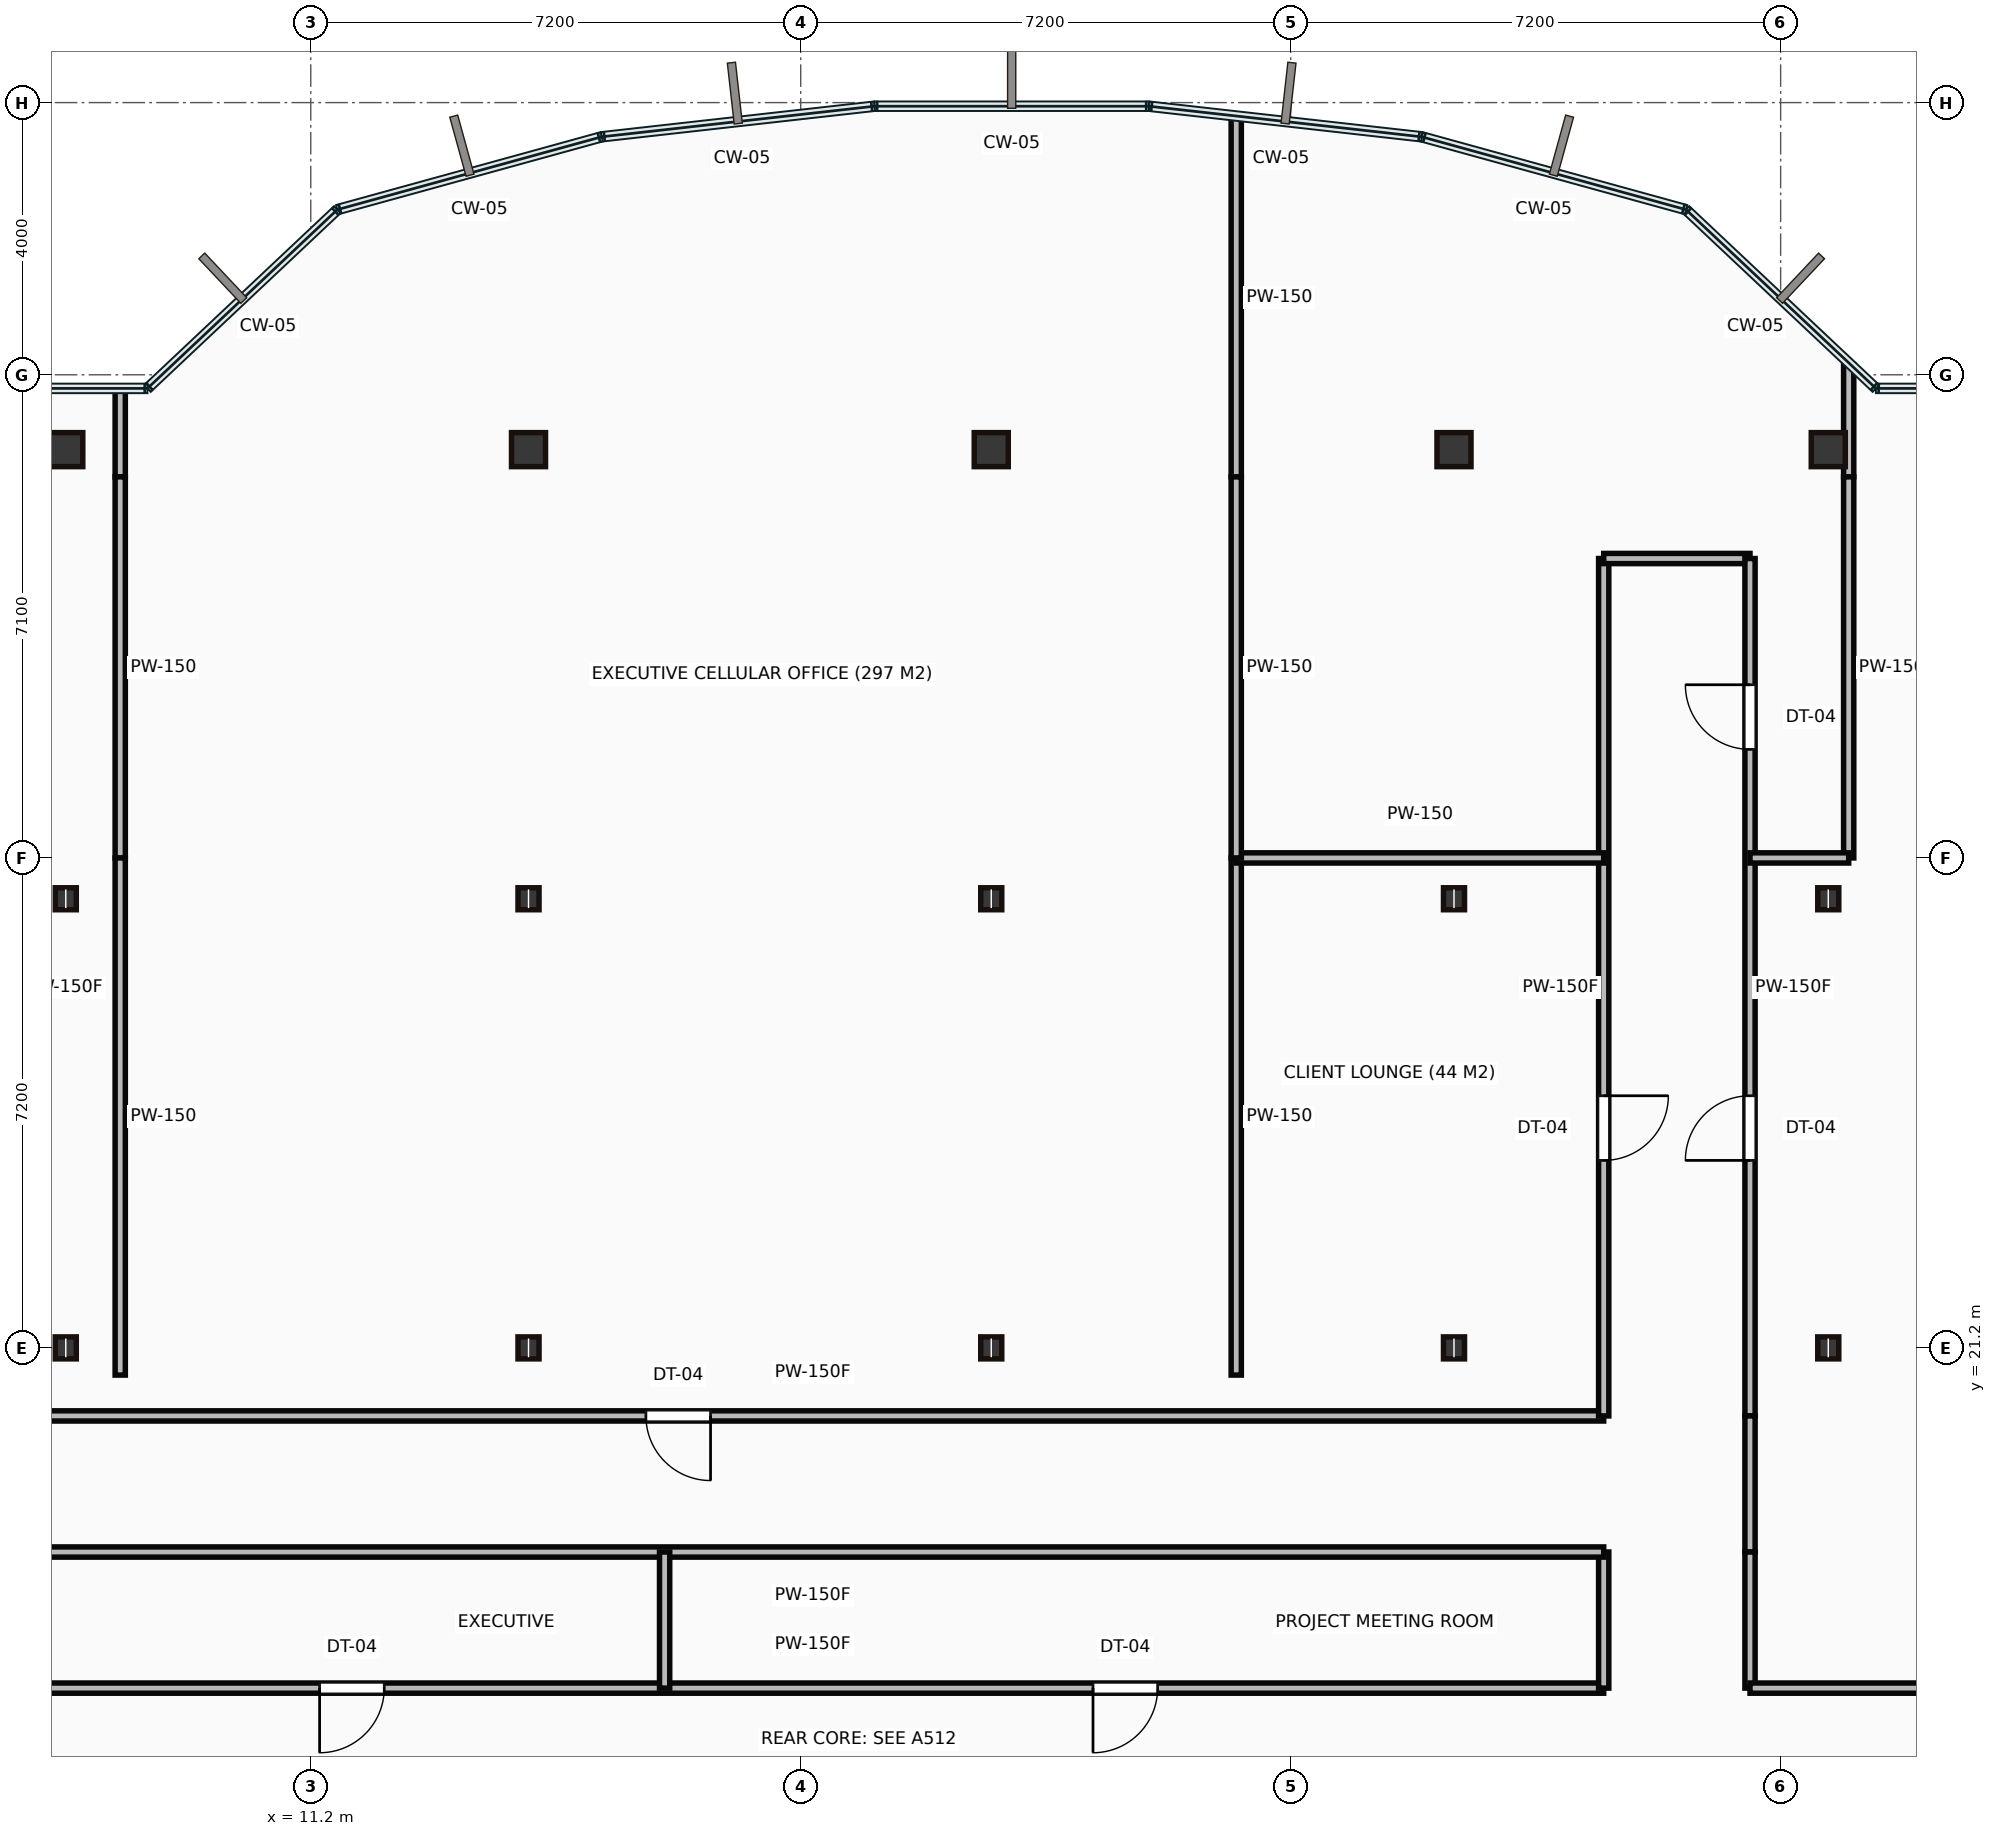
"""IFC4 building model, lengths in metres.
Left out: names, types, materials, properties, quantities, classifications, styles, units other than length and angle.
Written with IfcOpenShell. Run it as: python <this file> out.ifc"""

import sys

from ifc_helpers import new_model, si_unit, direction, frame, frame_2d, origin, origin_2d, place, context, subcontext, project, spatial, rectangle, hollow_rectangle, i_section, extrude, source, transform, mapped, element, fill, save


model = new_model("IFC4")
c1 = context("Model", 3, precision=1e-05, world=origin(), true_north=direction((0.0, 1.0)))
c2 = subcontext(c1, "Body", "Model", "MODEL_VIEW")
j1 = project(units=[si_unit("LENGTHUNIT", "METRE"), si_unit("PLANEANGLEUNIT", "RADIAN")], contexts=[c1])
p1 = place(None, origin())
s1 = spatial("IfcSite", under=j1, at=p1, CompositionType="ELEMENT")
p2 = place(p1, origin())
s2 = spatial("IfcBuilding", under=s1, at=p2, CompositionType="ELEMENT")
p3 = place(p2, frame((0.0, 0.0, 284.35)))
s3 = spatial("IfcBuildingStorey", under=s2, at=p3, CompositionType="ELEMENT", Elevation=284.35)
m1 = source(origin(), c2, "Body", "SweptSolid", [
    extrude(i_section(OverallWidth=0.309, OverallDepth=0.323, WebThickness=0.014, FlangeThickness=0.023, at=origin_2d()), origin(), (0.0, 0.0, 1.0), 3.65),
])
for number, where, z_axis, x_axis in (
    (1, (7.6, 21.2, 0.0), (0.0, 0.0, 1.0), (1.0, 0.0, 0.0)),
    (2, (7.6, 27.8, 0.0), (0.0, 0.0, 1.0), (1.0, 0.0, 0.0)),
):
    element("IfcColumn", number, at=place(p3, frame(where, z_axis=z_axis, x_axis=x_axis)), inside=s3, PredefinedType="COLUMN", context=c2, shape_type="MappedRepresentation", body=[
        mapped(m1, transform((0.0, 0.0, 0.0))),
    ])
m2 = source(origin(), c2, "Body", "SweptSolid", [
    extrude(hollow_rectangle(XDim=0.5, YDim=0.5, WallThickness=0.022, at=origin_2d()), origin(), (0.0, 0.0, 1.0), 3.65),
])
p4 = place(p3, frame((7.6, 34.4, 0.0), z_axis=(0.0, 0.0, 1.0), x_axis=(1.0, 0.0, 0.0)))
e3 = element("IfcColumn", 3, at=p4, inside=s3, PredefinedType="COLUMN", context=c2, shape_type="MappedRepresentation", body=[
    mapped(m2, transform((0.0, 0.0, 0.0))),
])
for number, where, z_axis, x_axis in (
    (4, (14.4, 21.2, 0.0), (0.0, 0.0, 1.0), (1.0, 0.0, 0.0)),
    (5, (14.4, 27.8, 0.0), (0.0, 0.0, 1.0), (1.0, 0.0, 0.0)),
):
    element("IfcColumn", number, at=place(p3, frame(where, z_axis=z_axis, x_axis=x_axis)), inside=s3, PredefinedType="COLUMN", context=c2, shape_type="MappedRepresentation", body=[
        mapped(m1, transform((0.0, 0.0, 0.0))),
    ])
p5 = place(p3, frame((14.4, 34.4, 0.0), z_axis=(0.0, 0.0, 1.0), x_axis=(1.0, 0.0, 0.0)))
e6 = element("IfcColumn", 6, at=p5, inside=s3, PredefinedType="COLUMN", context=c2, shape_type="MappedRepresentation", body=[
    mapped(m2, transform((0.0, 0.0, 0.0))),
])
for number, where, z_axis, x_axis in (
    (7, (21.2, 21.2, 0.0), (0.0, 0.0, 1.0), (1.0, 0.0, 0.0)),
    (8, (21.2, 27.8, 0.0), (0.0, 0.0, 1.0), (1.0, 0.0, 0.0)),
):
    element("IfcColumn", number, at=place(p3, frame(where, z_axis=z_axis, x_axis=x_axis)), inside=s3, PredefinedType="COLUMN", context=c2, shape_type="MappedRepresentation", body=[
        mapped(m1, transform((0.0, 0.0, 0.0))),
    ])
p6 = place(p3, frame((21.2, 34.4, 0.0), z_axis=(0.0, 0.0, 1.0), x_axis=(1.0, 0.0, 0.0)))
e9 = element("IfcColumn", 9, at=p6, inside=s3, PredefinedType="COLUMN", context=c2, shape_type="MappedRepresentation", body=[
    mapped(m2, transform((0.0, 0.0, 0.0))),
])
for number, where, z_axis, x_axis in (
    (10, (28.0, 21.2, 0.0), (0.0, 0.0, 1.0), (1.0, 0.0, 0.0)),
    (11, (28.0, 27.8, 0.0), (0.0, 0.0, 1.0), (1.0, 0.0, 0.0)),
):
    element("IfcColumn", number, at=place(p3, frame(where, z_axis=z_axis, x_axis=x_axis)), inside=s3, PredefinedType="COLUMN", context=c2, shape_type="MappedRepresentation", body=[
        mapped(m1, transform((0.0, 0.0, 0.0))),
    ])
p7 = place(p3, frame((28.0, 34.4, 0.0), z_axis=(0.0, 0.0, 1.0), x_axis=(1.0, 0.0, 0.0)))
e12 = element("IfcColumn", 12, at=p7, inside=s3, PredefinedType="COLUMN", context=c2, shape_type="MappedRepresentation", body=[
    mapped(m2, transform((0.0, 0.0, 0.0))),
])
for number, where, z_axis, x_axis in (
    (13, (33.5, 21.2, 0.0), (0.0, 0.0, 1.0), (1.0, 0.0, 0.0)),
    (14, (33.5, 27.8, 0.0), (0.0, 0.0, 1.0), (1.0, 0.0, 0.0)),
):
    element("IfcColumn", number, at=place(p3, frame(where, z_axis=z_axis, x_axis=x_axis)), inside=s3, PredefinedType="COLUMN", context=c2, shape_type="MappedRepresentation", body=[
        mapped(m1, transform((0.0, 0.0, 0.0))),
    ])
p8 = place(p3, frame((33.5, 34.4, 0.0), z_axis=(0.0, 0.0, 1.0), x_axis=(1.0, 0.0, 0.0)))
e15 = element("IfcColumn", 15, at=p8, inside=s3, PredefinedType="COLUMN", context=c2, shape_type="MappedRepresentation", body=[
    mapped(m2, transform((0.0, 0.0, 0.0))),
])
m3 = source(origin(), c2, "Body", "SweptSolid", [
    extrude(rectangle(XDim=23.25, YDim=0.15, at=frame_2d((11.625, 0.0))), origin(), (0.0, 0.0, 1.0), 3.4),
])
p9 = place(p3, frame((6.95, 20.2, 0.0), z_axis=(0.0, 0.0, 1.0), x_axis=(1.0, 0.0, 0.0)))
e16 = element("IfcWall", 16, at=p9, inside=s3, PredefinedType="PARTITIONING", context=c2, shape_type="MappedRepresentation", body=[
    mapped(m3, transform((0.0, 0.0, 0.0))),
])
p10 = place(p9, frame((9.175, 0.0, 0.0)))
e17 = element("IfcOpeningElement", 17, at=p10, cuts=e16, PredefinedType="OPENING", context=c2, shape_type="SweptSolid", body=[
    extrude(rectangle(XDim=0.95, YDim=2.15, at=frame_2d((0.475, 1.075))), frame((0.0, 0.085, 0.0), z_axis=(0.0, -1.0, 0.0), x_axis=(1.0, 0.0, 0.0)), (0.0, 0.0, 1.0), 0.17),
])
m4 = source(origin(), c2, "Body", "SweptSolid", [
    extrude(rectangle(XDim=12.6, YDim=0.15, at=frame_2d((6.3, 0.0))), origin(), (0.0, 0.0, 1.0), 3.4),
])
p11 = place(p3, frame((30.2, 20.2, 0.0), z_axis=(0.0, 0.0, 1.0), x_axis=(0.0, 1.0, 0.0)))
e18 = element("IfcWall", 18, at=p11, inside=s3, PredefinedType="PARTITIONING", context=c2, shape_type="MappedRepresentation", body=[
    mapped(m4, transform((0.0, 0.0, 0.0))),
])
p12 = place(p11, frame((3.755, 0.0, 0.0)))
e19 = element("IfcOpeningElement", 19, at=p12, cuts=e18, PredefinedType="OPENING", context=c2, shape_type="SweptSolid", body=[
    extrude(rectangle(XDim=0.95, YDim=2.15, at=frame_2d((0.475, 1.075))), frame((0.0, 0.085, 0.0), z_axis=(0.0, -1.0, 0.0), x_axis=(1.0, 0.0, 0.0)), (0.0, 0.0, 1.0), 0.17),
])
m5 = source(origin(), c2, "Body", "SweptSolid", [
    extrude(rectangle(XDim=2.15, YDim=0.15, at=frame_2d((1.075, 0.0))), origin(), (0.0, 0.0, 1.0), 3.4),
])
p13 = place(p3, frame((30.2, 32.8, 0.0), z_axis=(0.0, 0.0, 1.0), x_axis=(1.0, 0.0, 0.0)))
e20 = element("IfcWall", 20, at=p13, inside=s3, PredefinedType="PARTITIONING", context=c2, shape_type="MappedRepresentation", body=[
    mapped(m5, transform((0.0, 0.0, 0.0))),
])
p14 = place(p3, frame((32.35, 32.8, 0.0), z_axis=(0.0, 0.0, 1.0), x_axis=(0.0, -1.0, 0.0)))
e21 = element("IfcWall", 21, at=p14, inside=s3, PredefinedType="PARTITIONING", context=c2, shape_type="MappedRepresentation", body=[
    mapped(m4, transform((0.0, 0.0, 0.0))),
])
p15 = place(p14, frame((1.855, 0.0, 0.0)))
e22 = element("IfcOpeningElement", 22, at=p15, cuts=e21, PredefinedType="OPENING", context=c2, shape_type="SweptSolid", body=[
    extrude(rectangle(XDim=0.95, YDim=2.15, at=frame_2d((0.475, 1.075))), frame((0.0, 0.085, 0.0), z_axis=(0.0, -1.0, 0.0), x_axis=(1.0, 0.0, 0.0)), (0.0, 0.0, 1.0), 0.17),
])
p16 = place(p14, frame((7.895, 0.0, 0.0)))
e23 = element("IfcOpeningElement", 23, at=p16, cuts=e21, PredefinedType="OPENING", context=c2, shape_type="SweptSolid", body=[
    extrude(rectangle(XDim=0.95, YDim=2.15, at=frame_2d((0.475, 1.075))), frame((0.0, 0.085, 0.0), z_axis=(0.0, -1.0, 0.0), x_axis=(1.0, 0.0, 0.0)), (0.0, 0.0, 1.0), 0.17),
])
m6 = source(origin(), c2, "Body", "SweptSolid", [
    extrude(rectangle(XDim=2.0, YDim=0.15, at=frame_2d((1.0, 0.0))), origin(), (0.0, 0.0, 1.0), 3.4),
])
for number, where, z_axis, x_axis in (
    (24, (32.35, 20.2, 0.0), (0.0, 0.0, 1.0), (0.0, -1.0, 0.0)),
    (25, (32.35, 18.2, 0.0), (0.0, 0.0, 1.0), (0.0, -1.0, 0.0)),
):
    element("IfcWall", number, at=place(p3, frame(where, z_axis=z_axis, x_axis=x_axis)), inside=s3, PredefinedType="PARTITIONING", context=c2, shape_type="MappedRepresentation", body=[
        mapped(m6, transform((0.0, 0.0, 0.0))),
    ])
m7 = source(origin(), c2, "Body", "SweptSolid", [
    extrude(rectangle(XDim=6.85, YDim=0.15, at=frame_2d((3.425, 0.0))), origin(), (0.0, 0.0, 1.0), 3.4),
])
p17 = place(p3, frame((32.35, 16.2, 0.0), z_axis=(0.0, 0.0, 1.0), x_axis=(1.0, 0.0, 0.0)))
e26 = element("IfcWall", 26, at=p17, inside=s3, PredefinedType="PARTITIONING", context=c2, shape_type="MappedRepresentation", body=[
    mapped(m7, transform((0.0, 0.0, 0.0))),
])
p18 = place(p3, frame((6.95, 16.2, 0.0), z_axis=(0.0, 0.0, 1.0), x_axis=(1.0, 0.0, 0.0)))
e27 = element("IfcWall", 27, at=p18, inside=s3, PredefinedType="PARTITIONING", context=c2, shape_type="MappedRepresentation", body=[
    mapped(m3, transform((0.0, 0.0, 0.0))),
])
p19 = place(p18, frame((4.38, 0.0, 0.0)))
e28 = element("IfcOpeningElement", 28, at=p19, cuts=e27, PredefinedType="OPENING", context=c2, shape_type="SweptSolid", body=[
    extrude(rectangle(XDim=0.95, YDim=2.15, at=frame_2d((0.475, 1.075))), frame((0.0, 0.085, 0.0), z_axis=(0.0, -1.0, 0.0), x_axis=(1.0, 0.0, 0.0)), (0.0, 0.0, 1.0), 0.17),
])
p20 = place(p18, frame((15.745, 0.0, 0.0)))
e29 = element("IfcOpeningElement", 29, at=p20, cuts=e27, PredefinedType="OPENING", context=c2, shape_type="SweptSolid", body=[
    extrude(rectangle(XDim=0.95, YDim=2.15, at=frame_2d((0.475, 1.075))), frame((0.0, 0.085, 0.0), z_axis=(0.0, -1.0, 0.0), x_axis=(1.0, 0.0, 0.0)), (0.0, 0.0, 1.0), 0.17),
])
p21 = place(p3, frame((30.2, 16.2, 0.0), z_axis=(0.0, 0.0, 1.0), x_axis=(0.0, 1.0, 0.0)))
e30 = element("IfcWall", 30, at=p21, inside=s3, PredefinedType="PARTITIONING", context=c2, shape_type="MappedRepresentation", body=[
    mapped(m6, transform((0.0, 0.0, 0.0))),
])
p22 = place(p3, frame((30.2, 18.2, 0.0), z_axis=(0.0, 0.0, 1.0), x_axis=(-1.0, 0.0, 0.0)))
e31 = element("IfcWall", 31, at=p22, inside=s3, PredefinedType="PARTITIONING", context=c2, shape_type="MappedRepresentation", body=[
    mapped(m3, transform((0.0, 0.0, 0.0))),
])
m8 = source(origin(), c2, "Body", "SweptSolid", [
    extrude(rectangle(XDim=1.28, YDim=0.15, at=frame_2d((0.64, 0.0))), origin(), (0.0, 0.0, 1.0), 3.4),
])
p23 = place(p3, frame((8.4, 35.28, 0.0), z_axis=(0.0, 0.0, 1.0), x_axis=(0.0, -1.0, 0.0)))
e32 = element("IfcWall", 32, at=p23, inside=s3, PredefinedType="PARTITIONING", context=c2, shape_type="MappedRepresentation", body=[
    mapped(m8, transform((0.0, 0.0, 0.0))),
])
m9 = source(origin(), c2, "Body", "SweptSolid", [
    extrude(rectangle(XDim=5.6, YDim=0.15, at=frame_2d((2.8, 0.0))), origin(), (0.0, 0.0, 1.0), 3.4),
])
p24 = place(p3, frame((8.4, 34.0, 0.0), z_axis=(0.0, 0.0, 1.0), x_axis=(0.0, -1.0, 0.0)))
e33 = element("IfcWall", 33, at=p24, inside=s3, PredefinedType="PARTITIONING", context=c2, shape_type="MappedRepresentation", body=[
    mapped(m9, transform((0.0, 0.0, 0.0))),
])
m10 = source(origin(), c2, "Body", "SweptSolid", [
    extrude(rectangle(XDim=7.6, YDim=0.15, at=frame_2d((3.8, 0.0))), origin(), (0.0, 0.0, 1.0), 3.4),
])
p25 = place(p3, frame((8.4, 28.4, 0.0), z_axis=(0.0, 0.0, 1.0), x_axis=(0.0, -1.0, 0.0)))
e34 = element("IfcWall", 34, at=p25, inside=s3, PredefinedType="PARTITIONING", context=c2, shape_type="MappedRepresentation", body=[
    mapped(m10, transform((0.0, 0.0, 0.0))),
])
p26 = place(p3, frame((16.4, 18.2, 0.0), z_axis=(0.0, 0.0, 1.0), x_axis=(0.0, -1.0, 0.0)))
e35 = element("IfcWall", 35, at=p26, inside=s3, PredefinedType="PARTITIONING", context=c2, shape_type="MappedRepresentation", body=[
    mapped(m6, transform((0.0, 0.0, 0.0))),
])
p27 = place(p3, frame((24.8, 28.4, 0.0), z_axis=(0.0, 0.0, 1.0), x_axis=(0.0, -1.0, 0.0)))
e36 = element("IfcWall", 36, at=p27, inside=s3, PredefinedType="PARTITIONING", context=c2, shape_type="MappedRepresentation", body=[
    mapped(m10, transform((0.0, 0.0, 0.0))),
])
m11 = source(origin(), c2, "Body", "SweptSolid", [
    extrude(rectangle(XDim=5.4, YDim=0.15, at=frame_2d((2.7, 0.0))), origin(), (0.0, 0.0, 1.0), 3.4),
])
p28 = place(p3, frame((24.8, 28.4, 0.0), z_axis=(0.0, 0.0, 1.0), x_axis=(1.0, 0.0, 0.0)))
e37 = element("IfcWall", 37, at=p28, inside=s3, PredefinedType="PARTITIONING", context=c2, shape_type="MappedRepresentation", body=[
    mapped(m11, transform((0.0, 0.0, 0.0))),
])
m12 = source(origin(), c2, "Body", "SweptSolid", [
    extrude(rectangle(XDim=5.283, YDim=0.15, at=frame_2d((2.641, 0.0))), origin(), (0.0, 0.0, 1.0), 3.4),
])
p29 = place(p3, frame((24.8, 39.283, 0.0), z_axis=(0.0, 0.0, 1.0), x_axis=(0.0, -1.0, 0.0)))
e38 = element("IfcWall", 38, at=p29, inside=s3, PredefinedType="PARTITIONING", context=c2, shape_type="MappedRepresentation", body=[
    mapped(m12, transform((0.0, 0.0, 0.0))),
])
p30 = place(p3, frame((24.8, 34.0, 0.0), z_axis=(0.0, 0.0, 1.0), x_axis=(0.0, -1.0, 0.0)))
e39 = element("IfcWall", 39, at=p30, inside=s3, PredefinedType="PARTITIONING", context=c2, shape_type="MappedRepresentation", body=[
    mapped(m9, transform((0.0, 0.0, 0.0))),
])
m13 = source(origin(), c2, "Body", "SweptSolid", [
    extrude(rectangle(XDim=1.649, YDim=0.15, at=frame_2d((0.825, 0.0))), origin(), (0.0, 0.0, 1.0), 3.4),
])
p31 = place(p3, frame((33.8, 35.649, 0.0), z_axis=(0.0, 0.0, 1.0), x_axis=(0.0, -1.0, 0.0)))
e40 = element("IfcWall", 40, at=p31, inside=s3, PredefinedType="PARTITIONING", context=c2, shape_type="MappedRepresentation", body=[
    mapped(m13, transform((0.0, 0.0, 0.0))),
])
p32 = place(p3, frame((33.8, 34.0, 0.0), z_axis=(0.0, 0.0, 1.0), x_axis=(0.0, -1.0, 0.0)))
e41 = element("IfcWall", 41, at=p32, inside=s3, PredefinedType="PARTITIONING", context=c2, shape_type="MappedRepresentation", body=[
    mapped(m9, transform((0.0, 0.0, 0.0))),
])
m14 = source(origin(), c2, "Body", "SweptSolid", [
    extrude(rectangle(XDim=1.45, YDim=0.15, at=frame_2d((0.725, 0.0))), origin(), (0.0, 0.0, 1.0), 3.4),
])
p33 = place(p3, frame((33.8, 28.4, 0.0), z_axis=(0.0, 0.0, 1.0), x_axis=(-1.0, 0.0, 0.0)))
e42 = element("IfcWall", 42, at=p33, inside=s3, PredefinedType="PARTITIONING", context=c2, shape_type="MappedRepresentation", body=[
    mapped(m14, transform((0.0, 0.0, 0.0))),
])
m15 = source(origin(), c2, "Body", "SweptSolid", [
    extrude(rectangle(XDim=0.95, YDim=2.15, at=frame_2d((0.475, 1.075))), frame((0.0, 0.025, 0.0), z_axis=(0.0, -1.0, 0.0), x_axis=(1.0, 0.0, 0.0)), (0.0, 0.0, 1.0), 0.05),
])
p34 = place(p19, origin())
e43 = element("IfcDoor", 43, at=p34, inside=s3, OperationType="SINGLE_SWING_LEFT", PredefinedType="DOOR", context=c2, shape_type="MappedRepresentation", body=[
    mapped(m15, transform((0.0, 0.0, 0.0))),
])
fill(e28, e43)
p35 = place(p10, origin())
e44 = element("IfcDoor", 44, at=p35, inside=s3, OperationType="SINGLE_SWING_RIGHT", PredefinedType="DOOR", context=c2, shape_type="MappedRepresentation", body=[
    mapped(m15, transform((0.0, 0.0, 0.0))),
])
fill(e17, e44)
p36 = place(p20, origin())
e45 = element("IfcDoor", 45, at=p36, inside=s3, OperationType="SINGLE_SWING_LEFT", PredefinedType="DOOR", context=c2, shape_type="MappedRepresentation", body=[
    mapped(m15, transform((0.0, 0.0, 0.0))),
])
fill(e29, e45)
p37 = place(p12, origin())
e46 = element("IfcDoor", 46, at=p37, inside=s3, OperationType="SINGLE_SWING_RIGHT", PredefinedType="DOOR", context=c2, shape_type="MappedRepresentation", body=[
    mapped(m15, transform((0.0, 0.0, 0.0))),
])
fill(e19, e46)
p38 = place(p15, origin())
e47 = element("IfcDoor", 47, at=p38, inside=s3, OperationType="SINGLE_SWING_LEFT", PredefinedType="DOOR", context=c2, shape_type="MappedRepresentation", body=[
    mapped(m15, transform((0.0, 0.0, 0.0))),
])
fill(e22, e47)
p39 = place(p16, origin())
e48 = element("IfcDoor", 48, at=p39, inside=s3, OperationType="SINGLE_SWING_RIGHT", PredefinedType="DOOR", context=c2, shape_type="MappedRepresentation", body=[
    mapped(m15, transform((0.0, 0.0, 0.0))),
])
fill(e23, e48)
save(model, sys.argv[1])
